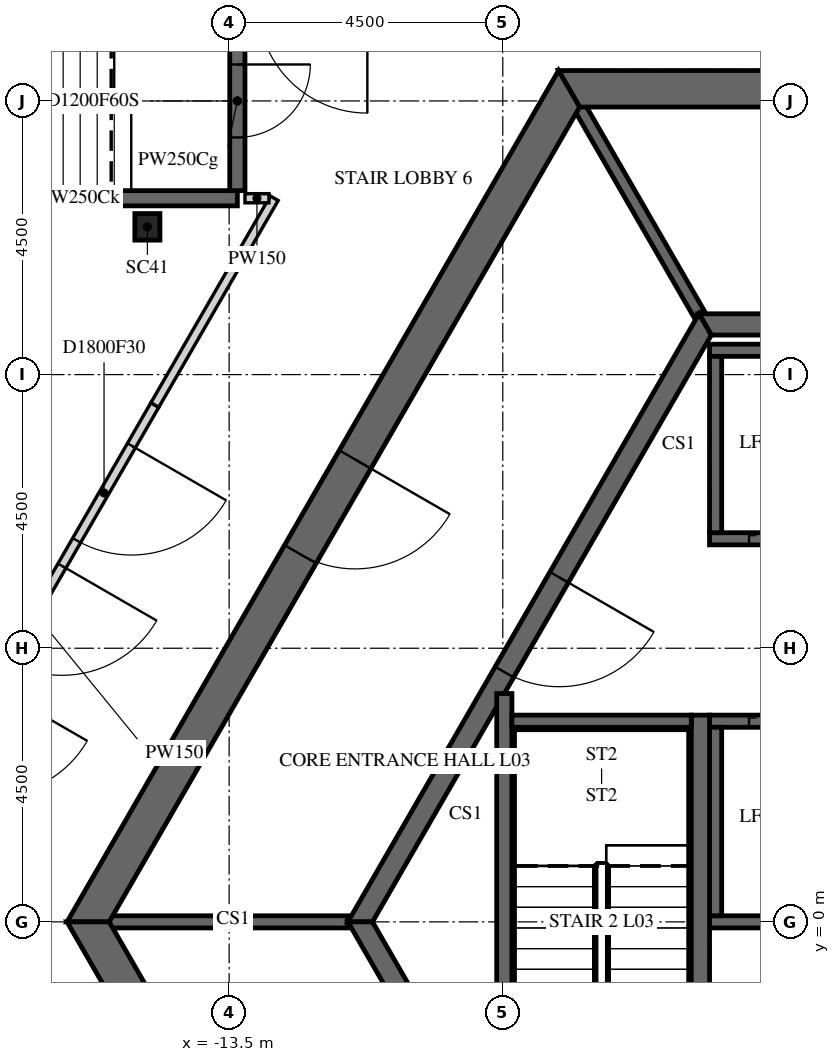
"""IFC4 building model, lengths in metres.
Left out: names, types, materials, properties, quantities, classifications, styles, units other than length and angle.
Written with IfcOpenShell. Run it as: python <this file> out.ifc"""

import sys

from ifc_helpers import new_model, si_unit, direction, frame, frame_2d, origin, origin_2d, place, context, subcontext, project, spatial, polyline, rectangle, i_section, outline, extrude, element, fill, save


model = new_model("IFC4")
c1 = context("Model", 3, precision=1e-05, world=origin(), true_north=direction((0.0, 1.0)))
c2 = subcontext(c1, "Body", "Model", "MODEL_VIEW")
j1 = project(units=[si_unit("LENGTHUNIT", "METRE"), si_unit("PLANEANGLEUNIT", "RADIAN")], contexts=[c1])
p1 = place(None, origin())
s1 = spatial("IfcSite", under=j1, at=p1, CompositionType="ELEMENT")
p2 = place(p1, origin())
s2 = spatial("IfcBuilding", under=s1, at=p2, CompositionType="ELEMENT")
p3 = place(p2, frame((0.0, 0.0, 20.5)))
s3 = spatial("IfcBuildingStorey", under=s2, at=p3, CompositionType="ELEMENT", Elevation=20.5)
p4 = place(p3, frame((-14.845, 11.43, -0.25), z_axis=(0.0, 0.0, 1.0), x_axis=(1.0, 0.0, 0.0)))
e1 = element("IfcColumn", 1, at=p4, inside=s3, PredefinedType="COLUMN", context=c2, shape_type="SweptSolid", body=[
    extrude(i_section(OverallWidth=0.412, OverallDepth=0.437, WebThickness=0.036, FlangeThickness=0.058, FilletRadius=0.015, at=origin_2d()), origin(), (0.0, 0.0, 1.0), 5.5),
])
p5 = place(p3, frame((-7.91, 13.7, -0.25), z_axis=(0.0, 0.0, 1.0), x_axis=(-0.499999880136, -0.866025472988, 0.0)))
e2 = element("IfcWall", 2, at=p5, inside=s3, PredefinedType="SHEAR", context=c2, shape_type="SweptSolid", body=[
    extrude(outline(polyline([(-0.173, -0.3), (15.993, -0.3), (15.646, 0.3), (0.173, 0.3), (-0.173, -0.3)])), origin(), (0.0, 0.0, 1.0), 5.5),
])
p6 = place(p5, frame((7.039, 0.0, 0.25)))
e3 = element("IfcOpeningElement", 3, at=p6, cuts=e2, PredefinedType="OPENING", context=c2, shape_type="SweptSolid", body=[
    extrude(rectangle(XDim=1.8, YDim=2.4, at=frame_2d((0.9, 1.2))), frame((0.0, 0.31, 0.0), z_axis=(0.0, -1.0, 0.0), x_axis=(1.0, 0.0, 0.0)), (0.0, 0.0, 1.0), 0.62),
])
p7 = place(p3, frame((-15.819, 0.0, -0.25), z_axis=(0.0, 0.0, 1.0), x_axis=(0.499999880136, -0.866025472988, 0.0)))
e4 = element("IfcWall", 4, at=p7, inside=s3, PredefinedType="SHEAR", context=c2, shape_type="SweptSolid", body=[
    extrude(outline(polyline([(-0.173, -0.3), (15.993, -0.3), (15.646, 0.3), (0.173, 0.3), (-0.173, -0.3)])), origin(), (0.0, 0.0, 1.0), 5.5),
])
p8 = place(p7, frame((6.981, 0.0, 0.25)))
e5 = element("IfcOpeningElement", 5, at=p8, cuts=e4, PredefinedType="OPENING", context=c2, shape_type="SweptSolid", body=[
    extrude(rectangle(XDim=1.8, YDim=2.4, at=frame_2d((0.9, 1.2))), frame((0.0, 0.31, 0.0), z_axis=(0.0, -1.0, 0.0), x_axis=(1.0, 0.0, 0.0)), (0.0, 0.0, 1.0), 0.62),
])
p9 = place(p3, frame((7.91, 13.7, -0.25), z_axis=(0.0, 0.0, 1.0), x_axis=(-1.0, 0.0, 0.0)))
e6 = element("IfcWall", 6, at=p9, inside=s3, PredefinedType="SHEAR", context=c2, shape_type="SweptSolid", body=[
    extrude(outline(polyline([(-0.173, -0.3), (15.993, -0.3), (15.646, 0.3), (0.173, 0.3), (-0.173, -0.3)])), origin(), (0.0, 0.0, 1.0), 5.5),
])
p10 = place(p9, frame((7.31, 0.0, 0.25)))
e7 = element("IfcOpeningElement", 7, at=p10, cuts=e6, PredefinedType="OPENING", context=c2, shape_type="SweptSolid", body=[
    extrude(rectangle(XDim=1.2, YDim=2.4, at=frame_2d((0.6, 1.2))), frame((0.0, 0.31, 0.0), z_axis=(0.0, -1.0, 0.0), x_axis=(1.0, 0.0, 0.0)), (0.0, 0.0, 1.0), 0.62),
])
p11 = place(p3, frame((-5.673, 9.825, -0.25), z_axis=(0.0, 0.0, 1.0), x_axis=(-0.499995046907, -0.866028263435, 0.0)))
e8 = element("IfcWall", 8, at=p11, inside=s3, PredefinedType="SHEAR", context=c2, shape_type="SweptSolid", body=[
    extrude(outline(polyline([(-0.101, -0.175), (11.446, -0.175), (11.244, 0.175), (0.101, 0.175), (-0.101, -0.175)])), origin(), (0.0, 0.0, 1.0), 5.5),
])
p12 = place(p11, frame((4.801, 0.0, 0.25)))
e9 = element("IfcOpeningElement", 9, at=p12, cuts=e8, PredefinedType="OPENING", context=c2, shape_type="SweptSolid", body=[
    extrude(rectangle(XDim=1.8, YDim=2.4, at=frame_2d((0.9, 1.2))), frame((0.0, 0.185, 0.0), z_axis=(0.0, -1.0, 0.0), x_axis=(1.0, 0.0, 0.0)), (0.0, 0.0, 1.0), 0.37),
])
p13 = place(p3, frame((-11.345, 0.0, -0.25), z_axis=(0.0, 0.0, 1.0), x_axis=(0.499995046907, -0.866028263435, 0.0)))
e10 = element("IfcWall", 10, at=p13, inside=s3, PredefinedType="SHEAR", context=c2, shape_type="SweptSolid", body=[
    extrude(outline(polyline([(-0.101, -0.175), (11.446, -0.175), (11.244, 0.175), (0.101, 0.175), (-0.101, -0.175)])), origin(), (0.0, 0.0, 1.0), 5.5),
])
p14 = place(p13, frame((4.744, 0.0, 0.25)))
e11 = element("IfcOpeningElement", 11, at=p14, cuts=e10, PredefinedType="OPENING", context=c2, shape_type="SweptSolid", body=[
    extrude(rectangle(XDim=1.8, YDim=2.4, at=frame_2d((0.9, 1.2))), frame((0.0, 0.185, 0.0), z_axis=(0.0, -1.0, 0.0), x_axis=(1.0, 0.0, 0.0)), (0.0, 0.0, 1.0), 0.37),
])
p15 = place(p3, frame((5.673, 9.825, -0.25), z_axis=(0.0, 0.0, 1.0), x_axis=(-1.0, 0.0, 0.0)))
e12 = element("IfcWall", 12, at=p15, inside=s3, PredefinedType="SHEAR", context=c2, shape_type="SweptSolid", body=[
    extrude(outline(polyline([(-0.101, -0.175), (11.446, -0.175), (11.244, 0.175), (0.101, 0.175), (-0.101, -0.175)])), origin(), (0.0, 0.0, 1.0), 5.5),
])
p16 = place(p3, frame((-5.6, 6.3, -0.25), z_axis=(0.0, 0.0, 1.0), x_axis=(1.0, 0.0, 0.0)))
e13 = element("IfcWall", 13, at=p16, inside=s3, PredefinedType="SHEAR", context=c2, shape_type="SweptSolid", body=[
    extrude(rectangle(XDim=11.2, YDim=0.2, at=frame_2d((5.6, 0.0))), origin(), (0.0, 0.0, 1.0), 5.5),
])
p17 = place(p16, frame((0.65, 0.0, 0.25)))
e14 = element("IfcOpeningElement", 14, at=p17, cuts=e13, PredefinedType="OPENING", context=c2, shape_type="SweptSolid", body=[
    extrude(rectangle(XDim=1.1, YDim=2.1, at=frame_2d((0.55, 1.05))), frame((0.0, 0.11, 0.0), z_axis=(0.0, -1.0, 0.0), x_axis=(1.0, 0.0, 0.0)), (0.0, 0.0, 1.0), 0.22),
])
p18 = place(p16, frame((2.85, 0.0, 0.25)))
e15 = element("IfcOpeningElement", 15, at=p18, cuts=e13, PredefinedType="OPENING", context=c2, shape_type="SweptSolid", body=[
    extrude(rectangle(XDim=1.1, YDim=2.1, at=frame_2d((0.55, 1.05))), frame((0.0, 0.11, 0.0), z_axis=(0.0, -1.0, 0.0), x_axis=(1.0, 0.0, 0.0)), (0.0, 0.0, 1.0), 0.22),
])
p19 = place(p16, frame((5.05, 0.0, 0.25)))
e16 = element("IfcOpeningElement", 16, at=p19, cuts=e13, PredefinedType="OPENING", context=c2, shape_type="SweptSolid", body=[
    extrude(rectangle(XDim=1.1, YDim=2.1, at=frame_2d((0.55, 1.05))), frame((0.0, 0.11, 0.0), z_axis=(0.0, -1.0, 0.0), x_axis=(1.0, 0.0, 0.0)), (0.0, 0.0, 1.0), 0.22),
])
p20 = place(p16, frame((7.25, 0.0, 0.25)))
e17 = element("IfcOpeningElement", 17, at=p20, cuts=e13, PredefinedType="OPENING", context=c2, shape_type="SweptSolid", body=[
    extrude(rectangle(XDim=1.1, YDim=2.1, at=frame_2d((0.55, 1.05))), frame((0.0, 0.11, 0.0), z_axis=(0.0, -1.0, 0.0), x_axis=(1.0, 0.0, 0.0)), (0.0, 0.0, 1.0), 0.22),
])
p21 = place(p16, frame((9.45, 0.0, 0.25)))
e18 = element("IfcOpeningElement", 18, at=p21, cuts=e13, PredefinedType="OPENING", context=c2, shape_type="SweptSolid", body=[
    extrude(rectangle(XDim=1.1, YDim=2.1, at=frame_2d((0.55, 1.05))), frame((0.0, 0.11, 0.0), z_axis=(0.0, -1.0, 0.0), x_axis=(1.0, 0.0, 0.0)), (0.0, 0.0, 1.0), 0.22),
])
p22 = place(p3, frame((-5.6, 9.4, -0.25), z_axis=(0.0, 0.0, 1.0), x_axis=(1.0, 0.0, 0.0)))
e19 = element("IfcWall", 19, at=p22, inside=s3, PredefinedType="SHEAR", context=c2, shape_type="SweptSolid", body=[
    extrude(rectangle(XDim=11.2, YDim=0.2, at=frame_2d((5.6, 0.0))), origin(), (0.0, 0.0, 1.0), 5.5),
])
p23 = place(p3, frame((-5.5, 6.4, -0.25), z_axis=(0.0, 0.0, 1.0), x_axis=(0.0, 1.0, 0.0)))
e20 = element("IfcWall", 20, at=p23, inside=s3, PredefinedType="SHEAR", context=c2, shape_type="SweptSolid", body=[
    extrude(rectangle(XDim=2.9, YDim=0.2, at=frame_2d((1.45, 0.0))), origin(), (0.0, 0.0, 1.0), 5.5),
])
p24 = place(p3, frame((-5.6, 3.3, -0.25), z_axis=(0.0, 0.0, 1.0), x_axis=(1.0, 0.0, 0.0)))
e21 = element("IfcWall", 21, at=p24, inside=s3, PredefinedType="SHEAR", context=c2, shape_type="SweptSolid", body=[
    extrude(rectangle(XDim=11.2, YDim=0.2, at=frame_2d((5.6, 0.0))), origin(), (0.0, 0.0, 1.0), 5.5),
])
p25 = place(p24, frame((0.65, 0.0, 0.25)))
e22 = element("IfcOpeningElement", 22, at=p25, cuts=e21, PredefinedType="OPENING", context=c2, shape_type="SweptSolid", body=[
    extrude(rectangle(XDim=1.1, YDim=2.1, at=frame_2d((0.55, 1.05))), frame((0.0, 0.11, 0.0), z_axis=(0.0, -1.0, 0.0), x_axis=(1.0, 0.0, 0.0)), (0.0, 0.0, 1.0), 0.22),
])
p26 = place(p24, frame((2.85, 0.0, 0.25)))
e23 = element("IfcOpeningElement", 23, at=p26, cuts=e21, PredefinedType="OPENING", context=c2, shape_type="SweptSolid", body=[
    extrude(rectangle(XDim=1.1, YDim=2.1, at=frame_2d((0.55, 1.05))), frame((0.0, 0.11, 0.0), z_axis=(0.0, -1.0, 0.0), x_axis=(1.0, 0.0, 0.0)), (0.0, 0.0, 1.0), 0.22),
])
p27 = place(p24, frame((5.05, 0.0, 0.25)))
e24 = element("IfcOpeningElement", 24, at=p27, cuts=e21, PredefinedType="OPENING", context=c2, shape_type="SweptSolid", body=[
    extrude(rectangle(XDim=1.1, YDim=2.1, at=frame_2d((0.55, 1.05))), frame((0.0, 0.11, 0.0), z_axis=(0.0, -1.0, 0.0), x_axis=(1.0, 0.0, 0.0)), (0.0, 0.0, 1.0), 0.22),
])
p28 = place(p24, frame((7.25, 0.0, 0.25)))
e25 = element("IfcOpeningElement", 25, at=p28, cuts=e21, PredefinedType="OPENING", context=c2, shape_type="SweptSolid", body=[
    extrude(rectangle(XDim=1.1, YDim=2.1, at=frame_2d((0.55, 1.05))), frame((0.0, 0.11, 0.0), z_axis=(0.0, -1.0, 0.0), x_axis=(1.0, 0.0, 0.0)), (0.0, 0.0, 1.0), 0.22),
])
p29 = place(p24, frame((9.45, 0.0, 0.25)))
e26 = element("IfcOpeningElement", 26, at=p29, cuts=e21, PredefinedType="OPENING", context=c2, shape_type="SweptSolid", body=[
    extrude(rectangle(XDim=1.1, YDim=2.1, at=frame_2d((0.55, 1.05))), frame((0.0, 0.11, 0.0), z_axis=(0.0, -1.0, 0.0), x_axis=(1.0, 0.0, 0.0)), (0.0, 0.0, 1.0), 0.22),
])
p30 = place(p3, frame((-5.6, 0.0, -0.25), z_axis=(0.0, 0.0, 1.0), x_axis=(1.0, 0.0, 0.0)))
e27 = element("IfcWall", 27, at=p30, inside=s3, PredefinedType="SHEAR", context=c2, shape_type="SweptSolid", body=[
    extrude(rectangle(XDim=11.2, YDim=0.2, at=frame_2d((5.6, 0.0))), origin(), (0.0, 0.0, 1.0), 5.5),
])
p31 = place(p3, frame((-5.5, 0.1, -0.25), z_axis=(0.0, 0.0, 1.0), x_axis=(0.0, 1.0, 0.0)))
e28 = element("IfcWall", 28, at=p31, inside=s3, PredefinedType="SHEAR", context=c2, shape_type="SweptSolid", body=[
    extrude(rectangle(XDim=3.1, YDim=0.2, at=frame_2d((1.55, 0.0))), origin(), (0.0, 0.0, 1.0), 5.5),
])
p32 = place(p3, frame((-5.773, 10.0, -0.25), z_axis=(0.0, 0.0, 1.0), x_axis=(-0.500038251005, 0.86600331843, 0.0)))
e29 = element("IfcWall", 29, at=p32, inside=s3, PredefinedType="SHEAR", context=c2, shape_type="SweptSolid", body=[
    extrude(rectangle(XDim=3.926, YDim=0.2, at=frame_2d((1.963, 0.0))), origin(), (0.0, 0.0, 1.0), 5.5),
])
p33 = place(p3, frame((-11.547, 0.0, -0.25), z_axis=(0.0, 0.0, 1.0), x_axis=(-1.0, 0.0, 0.0)))
e30 = element("IfcWall", 30, at=p33, inside=s3, PredefinedType="SHEAR", context=c2, shape_type="SweptSolid", body=[
    extrude(rectangle(XDim=3.926, YDim=0.2, at=frame_2d((1.963, 0.0))), origin(), (0.0, 0.0, 1.0), 5.5),
])
p34 = place(p3, frame((-5.75, -3.4, -0.25), z_axis=(0.0, 0.0, 1.0), x_axis=(0.0, 1.0, 0.0)))
e31 = element("IfcWall", 31, at=p34, inside=s3, PredefinedType="SHEAR", context=c2, shape_type="SweptSolid", body=[
    extrude(rectangle(XDim=6.8, YDim=0.3, at=frame_2d((3.4, 0.0))), origin(), (0.0, 0.0, 1.0), 5.5),
])
p35 = place(p3, frame((-8.975, -3.755, -0.25), z_axis=(0.0, 0.0, 1.0), x_axis=(0.0, 1.0, 0.0)))
e32 = element("IfcWall", 32, at=p35, inside=s3, PredefinedType="SHEAR", context=c2, shape_type="SweptSolid", body=[
    extrude(rectangle(XDim=7.51, YDim=0.25, at=frame_2d((3.755, 0.0))), origin(), (0.0, 0.0, 1.0), 5.5),
])
p36 = place(p3, frame((-8.85, 3.3, -0.25), z_axis=(0.0, 0.0, 1.0), x_axis=(1.0, 0.0, 0.0)))
e33 = element("IfcWall", 33, at=p36, inside=s3, PredefinedType="SHEAR", context=c2, shape_type="SweptSolid", body=[
    extrude(rectangle(XDim=2.95, YDim=0.2, at=frame_2d((1.475, 0.0))), origin(), (0.0, 0.0, 1.0), 5.5),
])
p37 = place(p3, frame((-14.722, 8.5, 0.0), z_axis=(0.0, 0.0, 1.0), x_axis=(-0.500085786821, -0.865975869075, 0.0)))
e34 = element("IfcWall", 34, at=p37, inside=s3, PredefinedType="PARTITIONING", context=c2, shape_type="SweptSolid", body=[
    extrude(rectangle(XDim=7.91, YDim=0.15, at=frame_2d((3.955, 0.0))), origin(), (0.0, 0.0, 1.0), 5.25),
])
p38 = place(p37, frame((0.771, 0.0, 0.0)))
e35 = element("IfcOpeningElement", 35, at=p38, cuts=e34, PredefinedType="OPENING", context=c2, shape_type="SweptSolid", body=[
    extrude(rectangle(XDim=1.8, YDim=2.1, at=frame_2d((0.9, 1.05))), frame((0.0, 0.085, 0.0), z_axis=(0.0, -1.0, 0.0), x_axis=(1.0, 0.0, 0.0)), (0.0, 0.0, 1.0), 0.17),
])
p39 = place(p37, frame((3.055, 0.0, 0.0)))
e36 = element("IfcOpeningElement", 36, at=p39, cuts=e34, PredefinedType="OPENING", context=c2, shape_type="SweptSolid", body=[
    extrude(rectangle(XDim=1.8, YDim=2.1, at=frame_2d((0.9, 1.05))), frame((0.0, 0.085, 0.0), z_axis=(0.0, -1.0, 0.0), x_axis=(1.0, 0.0, 0.0)), (0.0, 0.0, 1.0), 0.17),
])
p40 = place(p37, frame((5.339, 0.0, 0.0)))
e37 = element("IfcOpeningElement", 37, at=p40, cuts=e34, PredefinedType="OPENING", context=c2, shape_type="SweptSolid", body=[
    extrude(rectangle(XDim=1.8, YDim=2.1, at=frame_2d((0.9, 1.05))), frame((0.0, 0.085, 0.0), z_axis=(0.0, -1.0, 0.0), x_axis=(1.0, 0.0, 0.0)), (0.0, 0.0, 1.0), 0.17),
])
p41 = place(p3, frame((-13.365, 11.9, 0.0), z_axis=(0.0, 0.0, 1.0), x_axis=(-1.0, 0.0, 0.0)))
e38 = element("IfcWall", 38, at=p41, inside=s3, PredefinedType="PARTITIONING", context=c2, shape_type="SweptSolid", body=[
    extrude(rectangle(XDim=5.18, YDim=0.25, at=frame_2d((2.59, 0.0))), origin(), (0.0, 0.0, 1.0), 4.797),
])
p42 = place(p3, frame((-13.365, 14.975, 0.0), z_axis=(0.0, 0.0, 1.0), x_axis=(0.0, -1.0, 0.0)))
e39 = element("IfcWall", 39, at=p42, inside=s3, PredefinedType="PARTITIONING", context=c2, shape_type="SweptSolid", body=[
    extrude(rectangle(XDim=2.95, YDim=0.25, at=frame_2d((1.475, 0.0))), origin(), (0.0, 0.0, 1.0), 4.488),
])
p43 = place(p42, frame((0.875, 0.0, 0.0)))
e40 = element("IfcOpeningElement", 40, at=p43, cuts=e39, PredefinedType="OPENING", context=c2, shape_type="SweptSolid", body=[
    extrude(rectangle(XDim=1.2, YDim=2.1, at=frame_2d((0.6, 1.05))), frame((0.0, 0.135, 0.0), z_axis=(0.0, -1.0, 0.0), x_axis=(1.0, 0.0, 0.0)), (0.0, 0.0, 1.0), 0.27),
])
p44 = place(p3, frame((-12.759, 11.9, 0.0), z_axis=(0.0, 0.0, 1.0), x_axis=(-0.49999161165, -0.866030246746, 0.0)))
e41 = element("IfcWall", 41, at=p44, inside=s3, PredefinedType="PARTITIONING", context=c2, shape_type="SweptSolid", body=[
    extrude(rectangle(XDim=3.926, YDim=0.15, at=frame_2d((1.963, 0.0))), origin(), (0.0, 0.0, 1.0), 5.25),
])
p45 = place(p3, frame((-12.846, 11.9, 0.0), z_axis=(0.0, 0.0, 1.0), x_axis=(-1.0, 0.0, 0.0)))
e42 = element("IfcWall", 42, at=p45, inside=s3, PredefinedType="PARTITIONING", context=c2, shape_type="SweptSolid", body=[
    extrude(rectangle(XDim=0.394, YDim=0.15, at=frame_2d((0.197, 0.0))), origin(), (0.0, 0.0, 1.0), 5.25),
])
p46 = place(p6, origin())
e43 = element("IfcDoor", 43, at=p46, inside=s3, OperationType="DOUBLE_DOOR_SINGLE_SWING", PredefinedType="DOOR", context=c2, shape_type="SweptSolid", body=[
    extrude(rectangle(XDim=1.8, YDim=2.4, at=frame_2d((0.9, 1.2))), frame((0.0, 0.025, 0.0), z_axis=(0.0, -1.0, 0.0), x_axis=(1.0, 0.0, 0.0)), (0.0, 0.0, 1.0), 0.05),
])
fill(e3, e43)
p47 = place(p12, origin())
e44 = element("IfcDoor", 44, at=p47, inside=s3, OperationType="DOUBLE_DOOR_SINGLE_SWING", PredefinedType="DOOR", context=c2, shape_type="SweptSolid", body=[
    extrude(rectangle(XDim=1.8, YDim=2.4, at=frame_2d((0.9, 1.2))), frame((0.0, 0.025, 0.0), z_axis=(0.0, -1.0, 0.0), x_axis=(1.0, 0.0, 0.0)), (0.0, 0.0, 1.0), 0.05),
])
fill(e9, e44)
p48 = place(p17, origin())
e45 = element("IfcDoor", 45, at=p48, inside=s3, OperationType="SLIDING_TO_LEFT", PredefinedType="DOOR", context=c2, shape_type="SweptSolid", body=[
    extrude(rectangle(XDim=1.1, YDim=2.1, at=frame_2d((0.55, 1.05))), frame((0.0, 0.025, 0.0), z_axis=(0.0, -1.0, 0.0), x_axis=(1.0, 0.0, 0.0)), (0.0, 0.0, 1.0), 0.05),
])
fill(e14, e45)
p49 = place(p25, origin())
e46 = element("IfcDoor", 46, at=p49, inside=s3, OperationType="SLIDING_TO_LEFT", PredefinedType="DOOR", context=c2, shape_type="SweptSolid", body=[
    extrude(rectangle(XDim=1.1, YDim=2.1, at=frame_2d((0.55, 1.05))), frame((0.0, 0.025, 0.0), z_axis=(0.0, -1.0, 0.0), x_axis=(1.0, 0.0, 0.0)), (0.0, 0.0, 1.0), 0.05),
])
fill(e22, e46)
p50 = place(p38, origin())
e47 = element("IfcDoor", 47, at=p50, inside=s3, OperationType="DOUBLE_DOOR_SINGLE_SWING", PredefinedType="DOOR", context=c2, shape_type="SweptSolid", body=[
    extrude(rectangle(XDim=1.8, YDim=2.1, at=frame_2d((0.9, 1.05))), frame((0.0, 0.025, 0.0), z_axis=(0.0, -1.0, 0.0), x_axis=(1.0, 0.0, 0.0)), (0.0, 0.0, 1.0), 0.05),
])
fill(e35, e47)
p51 = place(p39, origin())
e48 = element("IfcDoor", 48, at=p51, inside=s3, OperationType="DOUBLE_DOOR_SINGLE_SWING", PredefinedType="DOOR", context=c2, shape_type="SweptSolid", body=[
    extrude(rectangle(XDim=1.8, YDim=2.1, at=frame_2d((0.9, 1.05))), frame((0.0, 0.025, 0.0), z_axis=(0.0, -1.0, 0.0), x_axis=(1.0, 0.0, 0.0)), (0.0, 0.0, 1.0), 0.05),
])
fill(e36, e48)
p52 = place(p43, origin())
e49 = element("IfcDoor", 49, at=p52, inside=s3, OperationType="SINGLE_SWING_RIGHT", PredefinedType="DOOR", context=c2, shape_type="SweptSolid", body=[
    extrude(rectangle(XDim=1.2, YDim=2.1, at=frame_2d((0.6, 1.05))), frame((0.0, 0.025, 0.0), z_axis=(0.0, -1.0, 0.0), x_axis=(1.0, 0.0, 0.0)), (0.0, 0.0, 1.0), 0.05),
])
fill(e40, e49)
save(model, sys.argv[1])
